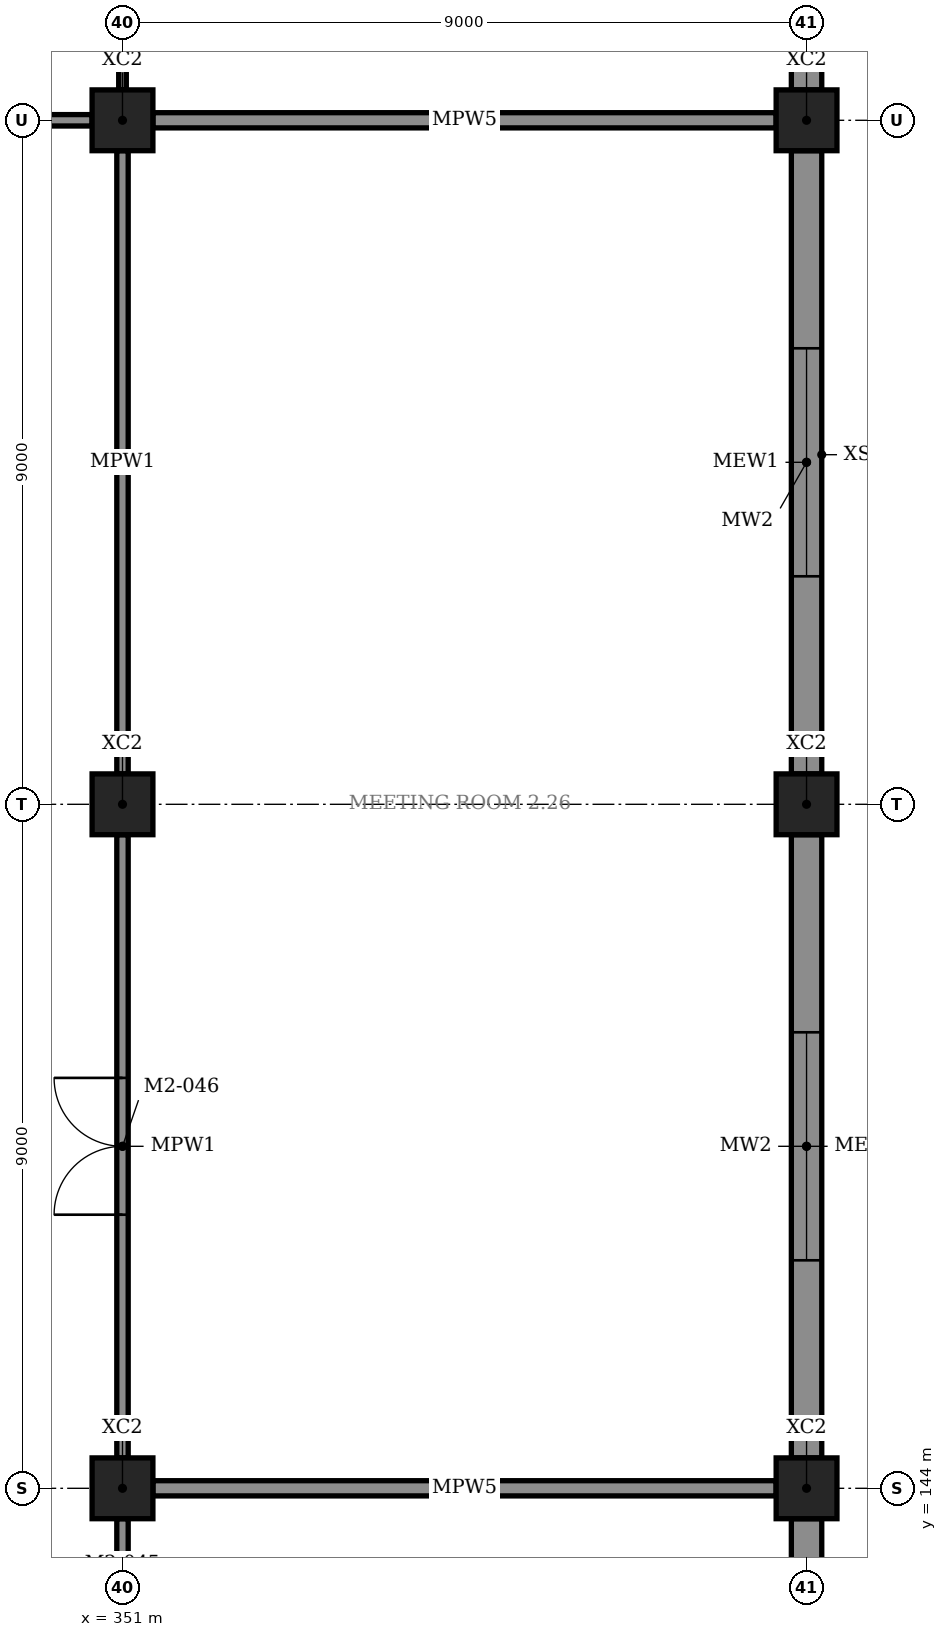
"""IFC4 building model, lengths in metres.
Left out: names, types, materials, properties, quantities, classifications, styles, units other than length and angle.
Written with IfcOpenShell. Run it as: python <this file> out.ifc"""

import sys

from ifc_helpers import new_model, si_unit, direction, frame, frame_2d, origin, origin_2d, place, context, subcontext, project, spatial, rectangle, extrude, element, fill, save


model = new_model("IFC4")
c1 = context("Model", 3, precision=1e-05, world=origin(), true_north=direction((0.0, 1.0)))
c2 = subcontext(c1, "Body", "Model", "MODEL_VIEW")
j1 = project(units=[si_unit("LENGTHUNIT", "METRE"), si_unit("PLANEANGLEUNIT", "RADIAN")], contexts=[c1])
p1 = place(None, origin())
s1 = spatial("IfcSite", under=j1, at=p1, CompositionType="ELEMENT")
p2 = place(p1, origin())
s2 = spatial("IfcBuilding", under=s1, at=p2, CompositionType="ELEMENT")
p3 = place(p2, frame((0.0, 0.0, 11.5)))
s3 = spatial("IfcBuildingStorey", under=s2, at=p3, CompositionType="ELEMENT", Elevation=11.5)
for number, where, z_axis, x_axis in (
    (1, (351.0, 144.0, 0.0), (0.0, 0.0, 1.0), (1.0, 0.0, 0.0)),
    (2, (351.0, 153.0, 0.0), (0.0, 0.0, 1.0), (1.0, 0.0, 0.0)),
    (3, (351.0, 162.0, 0.0), (0.0, 0.0, 1.0), (1.0, 0.0, 0.0)),
    (4, (360.0, 144.0, 0.0), (0.0, 0.0, 1.0), (1.0, 0.0, 0.0)),
    (5, (360.0, 153.0, 0.0), (0.0, 0.0, 1.0), (1.0, 0.0, 0.0)),
    (6, (360.0, 162.0, 0.0), (0.0, 0.0, 1.0), (1.0, 0.0, 0.0)),
):
    element("IfcColumn", number, at=place(p3, frame(where, z_axis=z_axis, x_axis=x_axis)), inside=s3, PredefinedType="COLUMN", context=c2, shape_type="SweptSolid", body=[
        extrude(rectangle(XDim=0.8, YDim=0.8, at=origin_2d()), origin(), (0.0, 0.0, 1.0), 5.5),
    ])
p4 = place(p3, frame((360.0, 135.4, 0.0), z_axis=(0.0, 0.0, 1.0), x_axis=(0.0, 1.0, 0.0)))
e7 = element("IfcWall", 7, at=p4, inside=s3, PredefinedType="STANDARD", context=c2, shape_type="SweptSolid", body=[
    extrude(rectangle(XDim=8.2, YDim=0.4, at=frame_2d((4.1, 0.0))), origin(), (0.0, 0.0, 1.0), 4.32),
])
p5 = place(p4, frame((2.6, 0.0, 0.9)))
e8 = element("IfcOpeningElement", 8, at=p5, cuts=e7, PredefinedType="OPENING", context=c2, shape_type="SweptSolid", body=[
    extrude(rectangle(XDim=3.0, YDim=2.1, at=frame_2d((1.5, 1.05))), frame((0.0, 0.21, 0.0), z_axis=(0.0, -1.0, 0.0), x_axis=(1.0, 0.0, 0.0)), (0.0, 0.0, 1.0), 0.42),
])
p6 = place(p3, frame((360.0, 144.4, 0.0), z_axis=(0.0, 0.0, 1.0), x_axis=(0.0, 1.0, 0.0)))
e9 = element("IfcWall", 9, at=p6, inside=s3, PredefinedType="STANDARD", context=c2, shape_type="SweptSolid", body=[
    extrude(rectangle(XDim=8.2, YDim=0.4, at=frame_2d((4.1, 0.0))), origin(), (0.0, 0.0, 1.0), 4.32),
])
p7 = place(p6, frame((2.6, 0.0, 0.9)))
e10 = element("IfcOpeningElement", 10, at=p7, cuts=e9, PredefinedType="OPENING", context=c2, shape_type="SweptSolid", body=[
    extrude(rectangle(XDim=3.0, YDim=2.1, at=frame_2d((1.5, 1.05))), frame((0.0, 0.21, 0.0), z_axis=(0.0, -1.0, 0.0), x_axis=(1.0, 0.0, 0.0)), (0.0, 0.0, 1.0), 0.42),
])
p8 = place(p3, frame((360.0, 153.4, 0.0), z_axis=(0.0, 0.0, 1.0), x_axis=(0.0, 1.0, 0.0)))
e11 = element("IfcWall", 11, at=p8, inside=s3, PredefinedType="STANDARD", context=c2, shape_type="SweptSolid", body=[
    extrude(rectangle(XDim=8.2, YDim=0.4, at=frame_2d((4.1, 0.0))), origin(), (0.0, 0.0, 1.0), 4.32),
])
p9 = place(p8, frame((2.6, 0.0, 0.9)))
e12 = element("IfcOpeningElement", 12, at=p9, cuts=e11, PredefinedType="OPENING", context=c2, shape_type="SweptSolid", body=[
    extrude(rectangle(XDim=3.0, YDim=2.1, at=frame_2d((1.5, 1.05))), frame((0.0, 0.21, 0.0), z_axis=(0.0, -1.0, 0.0), x_axis=(1.0, 0.0, 0.0)), (0.0, 0.0, 1.0), 0.42),
])
p10 = place(p3, frame((360.0, 162.4, 0.0), z_axis=(0.0, 0.0, 1.0), x_axis=(0.0, 1.0, 0.0)))
e13 = element("IfcWall", 13, at=p10, inside=s3, PredefinedType="STANDARD", context=c2, shape_type="SweptSolid", body=[
    extrude(rectangle(XDim=8.2, YDim=0.4, at=frame_2d((4.1, 0.0))), origin(), (0.0, 0.0, 1.0), 4.32),
])
p11 = place(p10, frame((1.638, 0.0, 0.9)))
e14 = element("IfcOpeningElement", 14, at=p11, cuts=e13, PredefinedType="OPENING", context=c2, shape_type="SweptSolid", body=[
    extrude(rectangle(XDim=3.0, YDim=2.1, at=frame_2d((1.5, 1.05))), frame((0.0, 0.21, 0.0), z_axis=(0.0, -1.0, 0.0), x_axis=(1.0, 0.0, 0.0)), (0.0, 0.0, 1.0), 0.42),
])
p12 = place(p3, frame((342.4, 162.0, 0.0), z_axis=(0.0, 0.0, 1.0), x_axis=(1.0, 0.0, 0.0)))
e15 = element("IfcWall", 15, at=p12, inside=s3, PredefinedType="PARTITIONING", context=c2, shape_type="SweptSolid", body=[
    extrude(rectangle(XDim=8.2, YDim=0.15, at=frame_2d((4.1, 0.0))), origin(), (0.0, 0.0, 1.0), 4.32),
])
p13 = place(p3, frame((351.0, 162.4, 0.0), z_axis=(0.0, 0.0, 1.0), x_axis=(0.0, 1.0, 0.0)))
e16 = element("IfcWall", 16, at=p13, inside=s3, PredefinedType="PARTITIONING", context=c2, shape_type="SweptSolid", body=[
    extrude(rectangle(XDim=6.275, YDim=0.1, at=frame_2d((3.138, 0.0))), origin(), (0.0, 0.0, 1.0), 4.32),
])
p14 = place(p3, frame((351.4, 144.0, 0.0), z_axis=(0.0, 0.0, 1.0), x_axis=(1.0, 0.0, 0.0)))
e17 = element("IfcWall", 17, at=p14, inside=s3, PredefinedType="PARTITIONING", context=c2, shape_type="SweptSolid", body=[
    extrude(rectangle(XDim=8.2, YDim=0.2, at=frame_2d((4.1, 0.0))), origin(), (0.0, 0.0, 1.0), 4.32),
])
p15 = place(p3, frame((351.0, 135.4, 0.0), z_axis=(0.0, 0.0, 1.0), x_axis=(0.0, 1.0, 0.0)))
e18 = element("IfcWall", 18, at=p15, inside=s3, PredefinedType="PARTITIONING", context=c2, shape_type="SweptSolid", body=[
    extrude(rectangle(XDim=8.2, YDim=0.15, at=frame_2d((4.1, 0.0))), origin(), (0.0, 0.0, 1.0), 4.32),
])
p16 = place(p15, frame((6.3, 0.0, 0.0)))
e19 = element("IfcOpeningElement", 19, at=p16, cuts=e18, PredefinedType="OPENING", context=c2, shape_type="SweptSolid", body=[
    extrude(rectangle(XDim=1.0, YDim=2.4, at=frame_2d((0.5, 1.2))), frame((0.0, 0.085, 0.0), z_axis=(0.0, -1.0, 0.0), x_axis=(1.0, 0.0, 0.0)), (0.0, 0.0, 1.0), 0.17),
])
p17 = place(p3, frame((351.4, 162.0, 0.0), z_axis=(0.0, 0.0, 1.0), x_axis=(1.0, 0.0, 0.0)))
e20 = element("IfcWall", 20, at=p17, inside=s3, PredefinedType="PARTITIONING", context=c2, shape_type="SweptSolid", body=[
    extrude(rectangle(XDim=8.2, YDim=0.2, at=frame_2d((4.1, 0.0))), origin(), (0.0, 0.0, 1.0), 4.32),
])
p18 = place(p3, frame((351.0, 144.4, 0.0), z_axis=(0.0, 0.0, 1.0), x_axis=(0.0, 1.0, 0.0)))
e21 = element("IfcWall", 21, at=p18, inside=s3, PredefinedType="PARTITIONING", context=c2, shape_type="SweptSolid", body=[
    extrude(rectangle(XDim=8.2, YDim=0.15, at=frame_2d((4.1, 0.0))), origin(), (0.0, 0.0, 1.0), 4.32),
])
p19 = place(p18, frame((3.2, 0.0, 0.0)))
e22 = element("IfcOpeningElement", 22, at=p19, cuts=e21, PredefinedType="OPENING", context=c2, shape_type="SweptSolid", body=[
    extrude(rectangle(XDim=1.8, YDim=2.4, at=frame_2d((0.9, 1.2))), frame((0.0, 0.085, 0.0), z_axis=(0.0, -1.0, 0.0), x_axis=(1.0, 0.0, 0.0)), (0.0, 0.0, 1.0), 0.17),
])
p20 = place(p3, frame((351.0, 153.4, 0.0), z_axis=(0.0, 0.0, 1.0), x_axis=(0.0, 1.0, 0.0)))
e23 = element("IfcWall", 23, at=p20, inside=s3, PredefinedType="PARTITIONING", context=c2, shape_type="SweptSolid", body=[
    extrude(rectangle(XDim=8.2, YDim=0.15, at=frame_2d((4.1, 0.0))), origin(), (0.0, 0.0, 1.0), 4.32),
])
p21 = place(p7, origin())
e24 = element("IfcWindow", 24, at=p21, inside=s3, PartitioningType="TRIPLE_PANEL_VERTICAL", PredefinedType="WINDOW", context=c2, shape_type="SweptSolid", body=[
    extrude(rectangle(XDim=3.0, YDim=2.1, at=frame_2d((1.5, 1.05))), frame((0.0, 0.03, 0.0), z_axis=(0.0, -1.0, 0.0), x_axis=(1.0, 0.0, 0.0)), (0.0, 0.0, 1.0), 0.06),
])
fill(e10, e24)
p22 = place(p9, origin())
e25 = element("IfcWindow", 25, at=p22, inside=s3, PartitioningType="TRIPLE_PANEL_VERTICAL", PredefinedType="WINDOW", context=c2, shape_type="SweptSolid", body=[
    extrude(rectangle(XDim=3.0, YDim=2.1, at=frame_2d((1.5, 1.05))), frame((0.0, 0.03, 0.0), z_axis=(0.0, -1.0, 0.0), x_axis=(1.0, 0.0, 0.0)), (0.0, 0.0, 1.0), 0.06),
])
fill(e12, e25)
p23 = place(p19, origin())
e26 = element("IfcDoor", 26, at=p23, inside=s3, OperationType="DOUBLE_DOOR_SINGLE_SWING", PredefinedType="DOOR", context=c2, shape_type="SweptSolid", body=[
    extrude(rectangle(XDim=1.8, YDim=2.4, at=frame_2d((0.9, 1.2))), frame((0.0, 0.025, 0.0), z_axis=(0.0, -1.0, 0.0), x_axis=(1.0, 0.0, 0.0)), (0.0, 0.0, 1.0), 0.05),
])
fill(e22, e26)
save(model, sys.argv[1])
